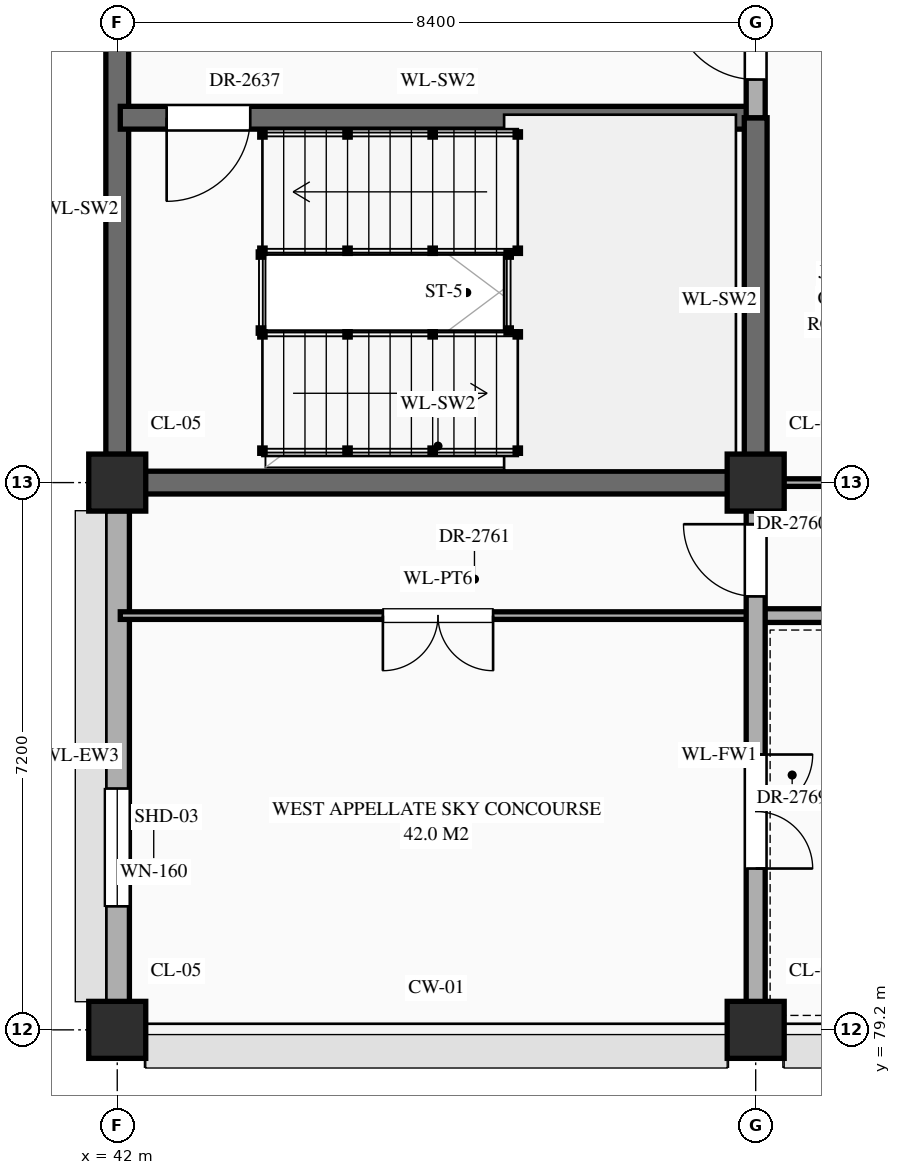
"""IFC4 building model, lengths in metres.
Left out: names, types, materials, properties, quantities, classifications, styles, units other than length and angle.
Written with IfcOpenShell. Run it as: python <this file> out.ifc"""

import sys

from ifc_helpers import new_model, si_unit, direction, frame, frame_2d, origin, origin_2d, place, context, subcontext, project, spatial, rectangle, extrude, element, fill, save


model = new_model("IFC4")
c1 = context("Model", 3, precision=1e-05, world=origin(), true_north=direction((0.0, 1.0)))
c2 = subcontext(c1, "Body", "Model", "MODEL_VIEW")
j1 = project(units=[si_unit("LENGTHUNIT", "METRE"), si_unit("PLANEANGLEUNIT", "RADIAN")], contexts=[c1])
p1 = place(None, origin())
s1 = spatial("IfcSite", under=j1, at=p1, CompositionType="ELEMENT")
p2 = place(p1, origin())
s2 = spatial("IfcBuilding", under=s1, at=p2, CompositionType="ELEMENT")
p3 = place(p2, frame((0.0, 0.0, 39.3)))
s3 = spatial("IfcBuildingStorey", under=s2, at=p3, CompositionType="ELEMENT", Elevation=39.3)
for number, where, z_axis, x_axis in (
    (1, (42.0, 79.2, 0.0), (0.0, 0.0, 1.0), (1.0, 0.0, 0.0)),
    (2, (42.0, 86.4, 0.0), (0.0, 0.0, 1.0), (1.0, 0.0, 0.0)),
    (3, (50.4, 79.2, 0.0), (0.0, 0.0, 1.0), (1.0, 0.0, 0.0)),
    (4, (50.4, 86.4, 0.0), (0.0, 0.0, 1.0), (1.0, 0.0, 0.0)),
):
    element("IfcColumn", number, at=place(p3, frame(where, z_axis=z_axis, x_axis=x_axis)), inside=s3, PredefinedType="COLUMN", context=c2, shape_type="SweptSolid", body=[
        extrude(rectangle(XDim=0.75, YDim=0.75, at=origin_2d()), origin(), (0.0, 0.0, 1.0), 4.2),
    ])
p4 = place(p3, frame((42.0, 79.57, 0.0), z_axis=(0.0, 0.0, 1.0), x_axis=(0.0, 1.0, 0.0)))
e5 = element("IfcWall", 5, at=p4, inside=s3, PredefinedType="STANDARD", context=c2, shape_type="SweptSolid", body=[
    extrude(rectangle(XDim=6.46, YDim=0.32, at=frame_2d((3.23, 0.0))), origin(), (0.0, 0.0, 1.0), 3.3),
])
p5 = place(p4, frame((1.255, 0.0, 0.85)))
e6 = element("IfcOpeningElement", 6, at=p5, cuts=e5, PredefinedType="OPENING", context=c2, shape_type="SweptSolid", body=[
    extrude(rectangle(XDim=1.55, YDim=2.12, at=frame_2d((0.775, 1.06))), frame((0.0, 0.172, 0.0), z_axis=(0.0, -1.0, 0.0), x_axis=(1.0, 0.0, 0.0)), (0.0, 0.0, 1.0), 0.344),
])
p6 = place(p3, frame((42.0, 86.77, 0.0), z_axis=(0.0, 0.0, 1.0), x_axis=(0.0, 1.0, 0.0)))
e7 = element("IfcWall", 7, at=p6, inside=s3, PredefinedType="SHEAR", context=c2, shape_type="SweptSolid", body=[
    extrude(rectangle(XDim=6.46, YDim=0.3, at=frame_2d((3.23, 0.0))), origin(), (0.0, 0.0, 1.0), 3.95),
])
p7 = place(p3, frame((42.04, 84.65, 0.0), z_axis=(0.0, 0.0, 1.0), x_axis=(1.0, 0.0, 0.0)))
e8 = element("IfcWall", 8, at=p7, inside=s3, PredefinedType="STANDARD", context=c2, shape_type="SweptSolid", body=[
    extrude(rectangle(XDim=8.36, YDim=0.1, at=frame_2d((4.18, 0.0))), origin(), (0.0, 0.0, 1.0), 3.95),
])
p8 = place(p7, frame((3.455, 0.0, 0.0)))
e9 = element("IfcOpeningElement", 9, at=p8, cuts=e8, PredefinedType="OPENING", context=c2, shape_type="SweptSolid", body=[
    extrude(rectangle(XDim=1.45, YDim=2.3, at=frame_2d((0.725, 1.15))), frame((0.0, 0.062, 0.0), z_axis=(0.0, -1.0, 0.0), x_axis=(1.0, 0.0, 0.0)), (0.0, 0.0, 1.0), 0.124),
])
p9 = place(p3, frame((50.4, 84.65, 0.0), z_axis=(0.0, 0.0, 1.0), x_axis=(1.0, 0.0, 0.0)))
e10 = element("IfcWall", 10, at=p9, inside=s3, PredefinedType="STANDARD", context=c2, shape_type="SweptSolid", body=[
    extrude(rectangle(XDim=16.8, YDim=0.18, at=frame_2d((8.4, 0.0))), origin(), (0.0, 0.0, 1.0), 3.95),
])
p10 = place(p9, frame((7.5, 0.0, 0.0)))
e11 = element("IfcOpeningElement", 11, at=p10, cuts=e10, PredefinedType="OPENING", context=c2, shape_type="SweptSolid", body=[
    extrude(rectangle(XDim=1.8, YDim=2.5, at=frame_2d((0.9, 1.25))), frame((0.0, 0.102, 0.0), z_axis=(0.0, -1.0, 0.0), x_axis=(1.0, 0.0, 0.0)), (0.0, 0.0, 1.0), 0.204),
])
p11 = place(p3, frame((42.04, 86.4, 0.0), z_axis=(0.0, 0.0, 1.0), x_axis=(1.0, 0.0, 0.0)))
e12 = element("IfcWall", 12, at=p11, inside=s3, PredefinedType="SHEAR", context=c2, shape_type="SweptSolid", body=[
    extrude(rectangle(XDim=8.36, YDim=0.3, at=frame_2d((4.18, 0.0))), origin(), (0.0, 0.0, 1.0), 3.95),
])
p12 = place(p3, frame((50.4, 86.4, 0.0), z_axis=(0.0, 0.0, 1.0), x_axis=(1.0, 0.0, 0.0)))
e13 = element("IfcWall", 13, at=p12, inside=s3, PredefinedType="STANDARD", context=c2, shape_type="SweptSolid", body=[
    extrude(rectangle(XDim=8.4, YDim=0.1, at=frame_2d((4.2, 0.0))), origin(), (0.0, 0.0, 1.0), 3.1),
])
p13 = place(p12, frame((0.968, 0.0, 0.0)))
e14 = element("IfcOpeningElement", 14, at=p13, cuts=e13, PredefinedType="OPENING", context=c2, shape_type="SweptSolid", body=[
    extrude(rectangle(XDim=1.16, YDim=2.3, at=frame_2d((0.58, 1.15))), frame((0.0, 0.062, 0.0), z_axis=(0.0, -1.0, 0.0), x_axis=(1.0, 0.0, 0.0)), (0.0, 0.0, 1.0), 0.124),
])
p14 = place(p12, frame((3.58, 0.0, 0.0)))
e15 = element("IfcOpeningElement", 15, at=p14, cuts=e13, PredefinedType="OPENING", context=c2, shape_type="SweptSolid", body=[
    extrude(rectangle(XDim=1.24, YDim=2.3, at=frame_2d((0.62, 1.15))), frame((0.0, 0.062, 0.0), z_axis=(0.0, -1.0, 0.0), x_axis=(1.0, 0.0, 0.0)), (0.0, 0.0, 1.0), 0.124),
])
p15 = place(p12, frame((6.212, 0.0, 0.0)))
e16 = element("IfcOpeningElement", 16, at=p15, cuts=e13, PredefinedType="OPENING", context=c2, shape_type="SweptSolid", body=[
    extrude(rectangle(XDim=1.28, YDim=2.35, at=frame_2d((0.64, 1.175))), frame((0.0, 0.062, 0.0), z_axis=(0.0, -1.0, 0.0), x_axis=(1.0, 0.0, 0.0)), (0.0, 0.0, 1.0), 0.124),
])
p16 = place(p3, frame((42.04, 91.2, 0.0), z_axis=(0.0, 0.0, 1.0), x_axis=(1.0, 0.0, 0.0)))
e17 = element("IfcWall", 17, at=p16, inside=s3, PredefinedType="SHEAR", context=c2, shape_type="SweptSolid", body=[
    extrude(rectangle(XDim=8.36, YDim=0.3, at=frame_2d((4.18, 0.0))), origin(), (0.0, 0.0, 1.0), 3.95),
])
p17 = place(p16, frame((0.61, 0.0, 0.0)))
e18 = element("IfcOpeningElement", 18, at=p17, cuts=e17, PredefinedType="OPENING", context=c2, shape_type="SweptSolid", body=[
    extrude(rectangle(XDim=1.1, YDim=2.2, at=frame_2d((0.55, 1.1))), frame((0.0, 0.162, 0.0), z_axis=(0.0, -1.0, 0.0), x_axis=(1.0, 0.0, 0.0)), (0.0, 0.0, 1.0), 0.324),
])
p18 = place(p3, frame((50.4, 79.24, 0.0), z_axis=(0.0, 0.0, 1.0), x_axis=(0.0, 1.0, 0.0)))
e19 = element("IfcWall", 19, at=p18, inside=s3, PredefinedType="STANDARD", context=c2, shape_type="SweptSolid", body=[
    extrude(rectangle(XDim=7.16, YDim=0.25, at=frame_2d((3.58, 0.0))), origin(), (0.0, 0.0, 1.0), 3.2),
])
p19 = place(p18, frame((5.663, 0.0, 0.0)))
e20 = element("IfcOpeningElement", 20, at=p19, cuts=e19, PredefinedType="OPENING", context=c2, shape_type="SweptSolid", body=[
    extrude(rectangle(XDim=0.95, YDim=2.15, at=frame_2d((0.475, 1.075))), frame((0.0, 0.137, 0.0), z_axis=(0.0, -1.0, 0.0), x_axis=(1.0, 0.0, 0.0)), (0.0, 0.0, 1.0), 0.274),
])
p20 = place(p18, frame((2.083, 0.0, 0.0)))
e21 = element("IfcOpeningElement", 21, at=p20, cuts=e19, PredefinedType="OPENING", context=c2, shape_type="SweptSolid", body=[
    extrude(rectangle(XDim=1.5, YDim=2.25, at=frame_2d((0.75, 1.125))), frame((0.0, 0.137, 0.0), z_axis=(0.0, -1.0, 0.0), x_axis=(1.0, 0.0, 0.0)), (0.0, 0.0, 1.0), 0.274),
])
p21 = place(p3, frame((50.4, 86.4, 0.0), z_axis=(0.0, 0.0, 1.0), x_axis=(0.0, 1.0, 0.0)))
e22 = element("IfcWall", 22, at=p21, inside=s3, PredefinedType="SHEAR", context=c2, shape_type="SweptSolid", body=[
    extrude(rectangle(XDim=4.8, YDim=0.3, at=frame_2d((2.4, 0.0))), origin(), (0.0, 0.0, 1.0), 3.95),
])
p22 = place(p3, frame((50.4, 91.2, 0.0), z_axis=(0.0, 0.0, 1.0), x_axis=(0.0, 1.0, 0.0)))
e23 = element("IfcWall", 23, at=p22, inside=s3, PredefinedType="STANDARD", context=c2, shape_type="SweptSolid", body=[
    extrude(rectangle(XDim=13.2, YDim=0.25, at=frame_2d((6.6, 0.0))), origin(), (0.0, 0.0, 1.0), 3.2),
])
p23 = place(p22, frame((0.502, 0.0, 0.0)))
e24 = element("IfcOpeningElement", 24, at=p23, cuts=e23, PredefinedType="OPENING", context=c2, shape_type="SweptSolid", body=[
    extrude(rectangle(XDim=1.1, YDim=2.2, at=frame_2d((0.55, 1.1))), frame((0.0, 0.137, 0.0), z_axis=(0.0, -1.0, 0.0), x_axis=(1.0, 0.0, 0.0)), (0.0, 0.0, 1.0), 0.274),
])
p24 = place(p22, frame((10.397, 0.0, 0.0)))
e25 = element("IfcOpeningElement", 25, at=p24, cuts=e23, PredefinedType="OPENING", context=c2, shape_type="SweptSolid", body=[
    extrude(rectangle(XDim=1.1, YDim=2.2, at=frame_2d((0.55, 1.1))), frame((0.0, 0.137, 0.0), z_axis=(0.0, -1.0, 0.0), x_axis=(1.0, 0.0, 0.0)), (0.0, 0.0, 1.0), 0.274),
])
p25 = place(p22, frame((3.248, 0.0, 0.0)))
e26 = element("IfcOpeningElement", 26, at=p25, cuts=e23, PredefinedType="OPENING", context=c2, shape_type="SweptSolid", body=[
    extrude(rectangle(XDim=1.0, YDim=2.2, at=frame_2d((0.5, 1.1))), frame((0.0, 0.137, 0.0), z_axis=(0.0, -1.0, 0.0), x_axis=(1.0, 0.0, 0.0)), (0.0, 0.0, 1.0), 0.274),
])
p26 = place(p5, origin())
e27 = element("IfcWindow", 27, at=p26, inside=s3, PartitioningType="SINGLE_PANEL", PredefinedType="WINDOW", context=c2, shape_type="SweptSolid", body=[
    extrude(rectangle(XDim=1.55, YDim=2.12, at=frame_2d((0.775, 1.06))), frame((0.0, 0.03, 0.0), z_axis=(0.0, -1.0, 0.0), x_axis=(1.0, 0.0, 0.0)), (0.0, 0.0, 1.0), 0.06),
])
fill(e6, e27)
p27 = place(p17, frame((1.1, 0.0, 0.0), z_axis=(0.0, 0.0, 1.0), x_axis=(-1.0, 0.0, 0.0)))
e28 = element("IfcDoor", 28, at=p27, inside=s3, OperationType="SINGLE_SWING_RIGHT", PredefinedType="DOOR", context=c2, shape_type="SweptSolid", body=[
    extrude(rectangle(XDim=1.1, YDim=2.2, at=frame_2d((0.55, 1.1))), frame((0.0, 0.025, 0.0), z_axis=(0.0, -1.0, 0.0), x_axis=(1.0, 0.0, 0.0)), (0.0, 0.0, 1.0), 0.05),
])
fill(e18, e28)
p28 = place(p23, origin())
e29 = element("IfcDoor", 29, at=p28, inside=s3, OperationType="SINGLE_SWING_RIGHT", PredefinedType="DOOR", context=c2, shape_type="SweptSolid", body=[
    extrude(rectangle(XDim=1.1, YDim=2.2, at=frame_2d((0.55, 1.1))), frame((0.0, 0.025, 0.0), z_axis=(0.0, -1.0, 0.0), x_axis=(1.0, 0.0, 0.0)), (0.0, 0.0, 1.0), 0.05),
])
fill(e24, e29)
p29 = place(p19, origin())
e30 = element("IfcDoor", 30, at=p29, inside=s3, OperationType="SINGLE_SWING_RIGHT", PredefinedType="DOOR", context=c2, shape_type="SweptSolid", body=[
    extrude(rectangle(XDim=0.95, YDim=2.15, at=frame_2d((0.475, 1.075))), frame((0.0, 0.025, 0.0), z_axis=(0.0, -1.0, 0.0), x_axis=(1.0, 0.0, 0.0)), (0.0, 0.0, 1.0), 0.05),
])
fill(e20, e30)
p30 = place(p8, frame((1.45, 0.0, 0.0), z_axis=(0.0, 0.0, 1.0), x_axis=(-1.0, 0.0, 0.0)))
e31 = element("IfcDoor", 31, at=p30, inside=s3, OperationType="DOUBLE_DOOR_SINGLE_SWING", PredefinedType="DOOR", context=c2, shape_type="SweptSolid", body=[
    extrude(rectangle(XDim=1.45, YDim=2.3, at=frame_2d((0.725, 1.15))), frame((0.0, 0.025, 0.0), z_axis=(0.0, -1.0, 0.0), x_axis=(1.0, 0.0, 0.0)), (0.0, 0.0, 1.0), 0.05),
])
fill(e9, e31)
p31 = place(p20, frame((1.5, 0.0, 0.0), z_axis=(0.0, 0.0, 1.0), x_axis=(-1.0, 0.0, 0.0)))
e32 = element("IfcDoor", 32, at=p31, inside=s3, OperationType="DOUBLE_DOOR_SINGLE_SWING", PredefinedType="DOOR", context=c2, shape_type="SweptSolid", body=[
    extrude(rectangle(XDim=1.5, YDim=2.25, at=frame_2d((0.75, 1.125))), frame((0.0, 0.025, 0.0), z_axis=(0.0, -1.0, 0.0), x_axis=(1.0, 0.0, 0.0)), (0.0, 0.0, 1.0), 0.05),
])
fill(e21, e32)
save(model, sys.argv[1])
